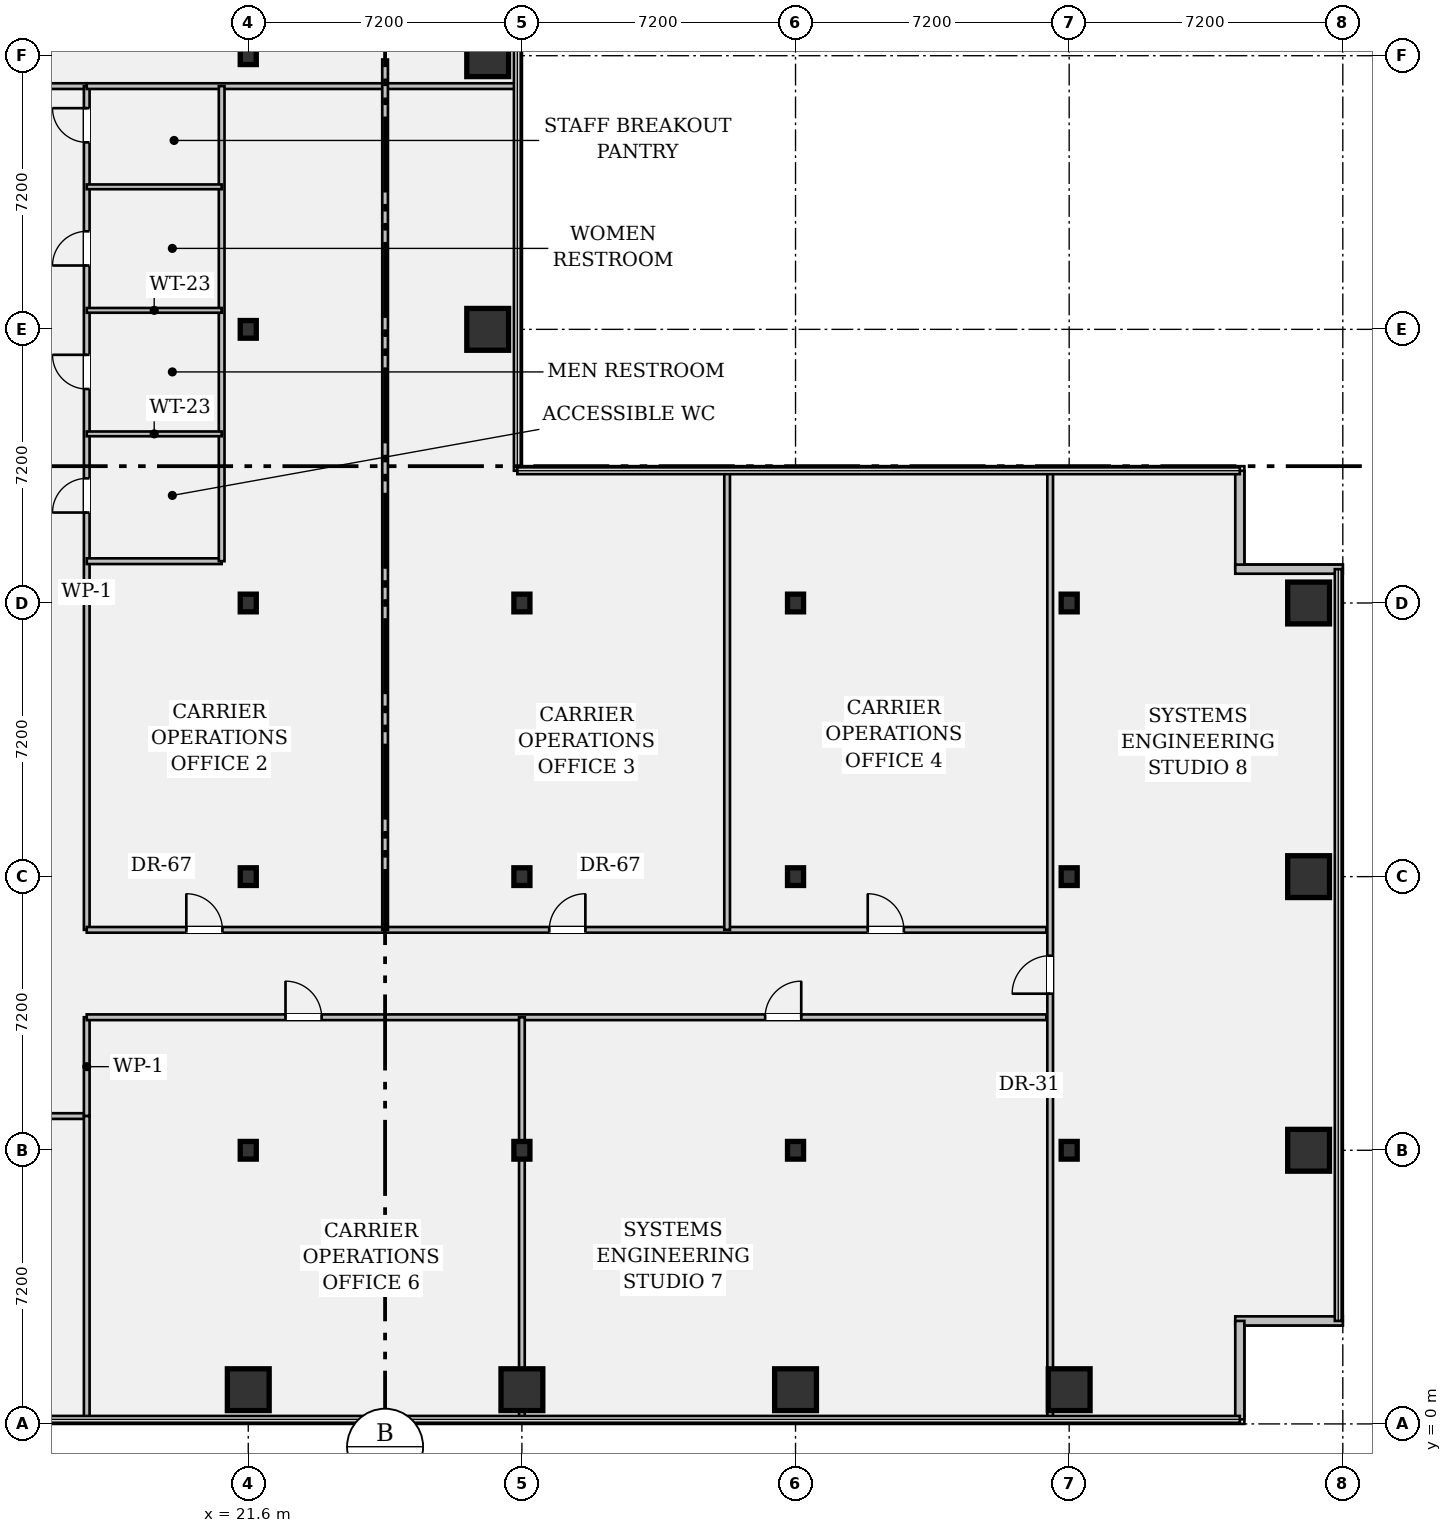
"""IFC4 building model, lengths in metres.
Left out: names, types, materials, properties, quantities, classifications, styles, units other than length and angle.
Written with IfcOpenShell. Run it as: python <this file> out.ifc"""

import sys

from ifc_helpers import new_model, si_unit, direction, frame, frame_2d, origin, origin_2d, place, context, subcontext, project, spatial, rectangle, hollow_rectangle, i_section, extrude, element, fill, save


model = new_model("IFC4")
c1 = context("Model", 3, precision=1e-05, world=origin(), true_north=direction((0.0, 1.0)))
c2 = subcontext(c1, "Body", "Model", "MODEL_VIEW")
j1 = project(units=[si_unit("LENGTHUNIT", "METRE"), si_unit("PLANEANGLEUNIT", "RADIAN")], contexts=[c1])
p1 = place(None, origin())
s1 = spatial("IfcSite", under=j1, at=p1, CompositionType="ELEMENT")
p2 = place(p1, origin())
s2 = spatial("IfcBuilding", under=s1, at=p2, CompositionType="ELEMENT")
p3 = place(p2, frame((0.0, 0.0, 31.15)))
s3 = spatial("IfcBuildingStorey", under=s2, at=p3, CompositionType="ELEMENT", Elevation=31.15)
p4 = place(p3, frame((21.6, 0.9, 0.0), z_axis=(0.0, 0.0, 1.0), x_axis=(1.0, 0.0, 0.0)))
e1 = element("IfcColumn", 1, at=p4, inside=s3, PredefinedType="COLUMN", context=c2, shape_type="SweptSolid", body=[
    extrude(hollow_rectangle(XDim=1.1, YDim=1.1, WallThickness=0.07, at=origin_2d()), origin(), (0.0, 0.0, 1.0), 3.57),
])
for number, where, z_axis, x_axis in (
    (2, (21.6, 7.2, 0.0), (0.0, 0.0, 1.0), (1.0, 0.0, 0.0)),
    (3, (21.6, 14.4, 0.0), (0.0, 0.0, 1.0), (1.0, 0.0, 0.0)),
    (4, (21.6, 21.6, 0.0), (0.0, 0.0, 1.0), (1.0, 0.0, 0.0)),
    (5, (21.6, 28.8, 0.0), (0.0, 0.0, 1.0), (1.0, 0.0, 0.0)),
    (6, (21.6, 36.0, 0.0), (0.0, 0.0, 1.0), (1.0, 0.0, 0.0)),
):
    element("IfcColumn", number, at=place(p3, frame(where, z_axis=z_axis, x_axis=x_axis)), inside=s3, PredefinedType="COLUMN", context=c2, shape_type="SweptSolid", body=[
        extrude(i_section(OverallWidth=0.422, OverallDepth=0.465, WebThickness=0.045, FlangeThickness=0.073, FilletRadius=0.018, at=origin_2d()), origin(), (0.0, 0.0, 1.0), 3.57),
    ])
for number, where, z_axis, x_axis in (
    (7, (27.9, 28.8, 0.0), (0.0, 0.0, 1.0), (1.0, 0.0, 0.0)),
    (8, (27.9, 36.0, 0.0), (0.0, 0.0, 1.0), (1.0, 0.0, 0.0)),
    (9, (28.8, 0.9, 0.0), (0.0, 0.0, 1.0), (1.0, 0.0, 0.0)),
):
    element("IfcColumn", number, at=place(p3, frame(where, z_axis=z_axis, x_axis=x_axis)), inside=s3, PredefinedType="COLUMN", context=c2, shape_type="SweptSolid", body=[
        extrude(hollow_rectangle(XDim=1.1, YDim=1.1, WallThickness=0.07, at=origin_2d()), origin(), (0.0, 0.0, 1.0), 3.57),
    ])
for number, where, z_axis, x_axis in (
    (10, (28.8, 7.2, 0.0), (0.0, 0.0, 1.0), (1.0, 0.0, 0.0)),
    (11, (28.8, 14.4, 0.0), (0.0, 0.0, 1.0), (1.0, 0.0, 0.0)),
    (12, (28.8, 21.6, 0.0), (0.0, 0.0, 1.0), (1.0, 0.0, 0.0)),
):
    element("IfcColumn", number, at=place(p3, frame(where, z_axis=z_axis, x_axis=x_axis)), inside=s3, PredefinedType="COLUMN", context=c2, shape_type="SweptSolid", body=[
        extrude(i_section(OverallWidth=0.422, OverallDepth=0.465, WebThickness=0.045, FlangeThickness=0.073, FilletRadius=0.018, at=origin_2d()), origin(), (0.0, 0.0, 1.0), 3.57),
    ])
p5 = place(p3, frame((36.0, 0.9, 0.0), z_axis=(0.0, 0.0, 1.0), x_axis=(1.0, 0.0, 0.0)))
e13 = element("IfcColumn", 13, at=p5, inside=s3, PredefinedType="COLUMN", context=c2, shape_type="SweptSolid", body=[
    extrude(hollow_rectangle(XDim=1.1, YDim=1.1, WallThickness=0.07, at=origin_2d()), origin(), (0.0, 0.0, 1.0), 3.57),
])
for number, where, z_axis, x_axis in (
    (14, (36.0, 7.2, 0.0), (0.0, 0.0, 1.0), (1.0, 0.0, 0.0)),
    (15, (36.0, 14.4, 0.0), (0.0, 0.0, 1.0), (1.0, 0.0, 0.0)),
    (16, (36.0, 21.6, 0.0), (0.0, 0.0, 1.0), (1.0, 0.0, 0.0)),
):
    element("IfcColumn", number, at=place(p3, frame(where, z_axis=z_axis, x_axis=x_axis)), inside=s3, PredefinedType="COLUMN", context=c2, shape_type="SweptSolid", body=[
        extrude(i_section(OverallWidth=0.422, OverallDepth=0.465, WebThickness=0.045, FlangeThickness=0.073, FilletRadius=0.018, at=origin_2d()), origin(), (0.0, 0.0, 1.0), 3.57),
    ])
p6 = place(p3, frame((43.2, 0.9, 0.0), z_axis=(0.0, 0.0, 1.0), x_axis=(1.0, 0.0, 0.0)))
e17 = element("IfcColumn", 17, at=p6, inside=s3, PredefinedType="COLUMN", context=c2, shape_type="SweptSolid", body=[
    extrude(hollow_rectangle(XDim=1.1, YDim=1.1, WallThickness=0.07, at=origin_2d()), origin(), (0.0, 0.0, 1.0), 3.57),
])
for number, where, z_axis, x_axis in (
    (18, (43.2, 7.2, 0.0), (0.0, 0.0, 1.0), (1.0, 0.0, 0.0)),
    (19, (43.2, 14.4, 0.0), (0.0, 0.0, 1.0), (1.0, 0.0, 0.0)),
    (20, (43.2, 21.6, 0.0), (0.0, 0.0, 1.0), (1.0, 0.0, 0.0)),
):
    element("IfcColumn", number, at=place(p3, frame(where, z_axis=z_axis, x_axis=x_axis)), inside=s3, PredefinedType="COLUMN", context=c2, shape_type="SweptSolid", body=[
        extrude(i_section(OverallWidth=0.422, OverallDepth=0.465, WebThickness=0.045, FlangeThickness=0.073, FilletRadius=0.018, at=origin_2d()), origin(), (0.0, 0.0, 1.0), 3.57),
    ])
for number, where, z_axis, x_axis in (
    (21, (49.5, 7.2, 0.0), (0.0, 0.0, 1.0), (1.0, 0.0, 0.0)),
    (22, (49.5, 14.4, 0.0), (0.0, 0.0, 1.0), (1.0, 0.0, 0.0)),
    (23, (49.5, 21.6, 0.0), (0.0, 0.0, 1.0), (1.0, 0.0, 0.0)),
):
    element("IfcColumn", number, at=place(p3, frame(where, z_axis=z_axis, x_axis=x_axis)), inside=s3, PredefinedType="COLUMN", context=c2, shape_type="SweptSolid", body=[
        extrude(hollow_rectangle(XDim=1.1, YDim=1.1, WallThickness=0.07, at=origin_2d()), origin(), (0.0, 0.0, 1.0), 3.57),
    ])
p7 = place(p3, frame((47.69, 25.08, 0.0), z_axis=(0.0, 0.0, 1.0), x_axis=(0.0, -1.0, 0.0)))
e24 = element("IfcWall", 24, at=p7, inside=s3, PredefinedType="STANDARD", context=c2, shape_type="SweptSolid", body=[
    extrude(rectangle(XDim=2.59, YDim=0.24, at=frame_2d((1.295, 0.0))), origin(), (0.0, 0.0, 1.0), 3.57),
])
for number, where, z_axis, x_axis in (
    (25, (47.57, 22.49, 0.0), (0.0, 0.0, 1.0), (1.0, 0.0, 0.0)),
    (26, (50.4, 2.71, 0.0), (0.0, 0.0, 1.0), (-1.0, 0.0, 0.0)),
):
    element("IfcWall", number, at=place(p3, frame(where, z_axis=z_axis, x_axis=x_axis)), inside=s3, PredefinedType="STANDARD", context=c2, shape_type="SweptSolid", body=[
        extrude(rectangle(XDim=2.83, YDim=0.24, at=frame_2d((1.415, 0.0))), origin(), (0.0, 0.0, 1.0), 3.57),
    ])
p8 = place(p3, frame((47.69, 2.71, 0.0), z_axis=(0.0, 0.0, 1.0), x_axis=(0.0, -1.0, 0.0)))
e27 = element("IfcWall", 27, at=p8, inside=s3, PredefinedType="STANDARD", context=c2, shape_type="SweptSolid", body=[
    extrude(rectangle(XDim=2.59, YDim=0.24, at=frame_2d((1.295, 0.0))), origin(), (0.0, 0.0, 1.0), 3.57),
])
p9 = place(p3, frame((14.4, 8.1, 0.0), z_axis=(0.0, 0.0, 1.0), x_axis=(1.0, 0.0, 0.0)))
e28 = element("IfcWall", 28, at=p9, inside=s3, PredefinedType="PARTITIONING", context=c2, shape_type="SweptSolid", body=[
    extrude(rectangle(XDim=2.95, YDim=0.15, at=frame_2d((1.475, 0.0))), origin(), (0.0, 0.0, 1.0), 2.628),
])
p10 = place(p9, frame((0.95, 0.0, 0.0)))
e29 = element("IfcOpeningElement", 29, at=p10, cuts=e28, PredefinedType="OPENING", context=c2, shape_type="SweptSolid", body=[
    extrude(rectangle(XDim=0.95, YDim=2.15, at=frame_2d((0.475, 1.075))), frame((0.0, 0.087, 0.0), z_axis=(0.0, -1.0, 0.0), x_axis=(1.0, 0.0, 0.0)), (0.0, 0.0, 1.0), 0.174),
])
p11 = place(p3, frame((14.4, 35.2, 0.0), z_axis=(0.0, 0.0, 1.0), x_axis=(1.0, 0.0, 0.0)))
e30 = element("IfcWall", 30, at=p11, inside=s3, PredefinedType="PARTITIONING", context=c2, shape_type="SweptSolid", body=[
    extrude(rectangle(XDim=2.95, YDim=0.15, at=frame_2d((1.475, 0.0))), origin(), (0.0, 0.0, 1.0), 2.628),
])
p12 = place(p11, frame((0.95, 0.0, 0.0)))
e31 = element("IfcOpeningElement", 31, at=p12, cuts=e30, PredefinedType="OPENING", context=c2, shape_type="SweptSolid", body=[
    extrude(rectangle(XDim=1.0, YDim=2.15, at=frame_2d((0.5, 1.075))), frame((0.0, 0.087, 0.0), z_axis=(0.0, -1.0, 0.0), x_axis=(1.0, 0.0, 0.0)), (0.0, 0.0, 1.0), 0.174),
])
p13 = place(p3, frame((17.35, 8.1, 0.0), z_axis=(0.0, 0.0, 1.0), x_axis=(0.0, 1.0, 0.0)))
e32 = element("IfcWall", 32, at=p13, inside=s3, PredefinedType="PARTITIONING", context=c2, shape_type="SweptSolid", body=[
    extrude(rectangle(XDim=2.6, YDim=0.15, at=frame_2d((1.3, 0.0))), origin(), (0.0, 0.0, 1.0), 3.57),
])
p14 = place(p3, frame((17.35, 13.0, 0.0), z_axis=(0.0, 0.0, 1.0), x_axis=(0.0, 1.0, 0.0)))
e33 = element("IfcWall", 33, at=p14, inside=s3, PredefinedType="PARTITIONING", context=c2, shape_type="SweptSolid", body=[
    extrude(rectangle(XDim=22.2, YDim=0.15, at=frame_2d((11.1, 0.0))), origin(), (0.0, 0.0, 1.0), 2.628),
])
p15 = place(p14, frame((10.98, 0.0, 0.0)))
e34 = element("IfcOpeningElement", 34, at=p15, cuts=e33, PredefinedType="OPENING", context=c2, shape_type="SweptSolid", body=[
    extrude(rectangle(XDim=0.9, YDim=2.15, at=frame_2d((0.45, 1.075))), frame((0.0, 0.087, 0.0), z_axis=(0.0, -1.0, 0.0), x_axis=(1.0, 0.0, 0.0)), (0.0, 0.0, 1.0), 0.174),
])
p16 = place(p14, frame((14.23, 0.0, 0.0)))
e35 = element("IfcOpeningElement", 35, at=p16, cuts=e33, PredefinedType="OPENING", context=c2, shape_type="SweptSolid", body=[
    extrude(rectangle(XDim=0.9, YDim=2.15, at=frame_2d((0.45, 1.075))), frame((0.0, 0.087, 0.0), z_axis=(0.0, -1.0, 0.0), x_axis=(1.0, 0.0, 0.0)), (0.0, 0.0, 1.0), 0.174),
])
p17 = place(p14, frame((17.48, 0.0, 0.0)))
e36 = element("IfcOpeningElement", 36, at=p17, cuts=e33, PredefinedType="OPENING", context=c2, shape_type="SweptSolid", body=[
    extrude(rectangle(XDim=0.9, YDim=2.15, at=frame_2d((0.45, 1.075))), frame((0.0, 0.087, 0.0), z_axis=(0.0, -1.0, 0.0), x_axis=(1.0, 0.0, 0.0)), (0.0, 0.0, 1.0), 0.174),
])
p18 = place(p14, frame((20.72, 0.0, 0.0)))
e37 = element("IfcOpeningElement", 37, at=p18, cuts=e33, PredefinedType="OPENING", context=c2, shape_type="SweptSolid", body=[
    extrude(rectangle(XDim=0.9, YDim=2.15, at=frame_2d((0.45, 1.075))), frame((0.0, 0.087, 0.0), z_axis=(0.0, -1.0, 0.0), x_axis=(1.0, 0.0, 0.0)), (0.0, 0.0, 1.0), 0.174),
])
p19 = place(p3, frame((17.35, 10.7, 0.0), z_axis=(0.0, 0.0, 1.0), x_axis=(1.0, 0.0, 0.0)))
e38 = element("IfcWall", 38, at=p19, inside=s3, PredefinedType="PARTITIONING", context=c2, shape_type="SweptSolid", body=[
    extrude(rectangle(XDim=25.25, YDim=0.15, at=frame_2d((12.625, 0.0))), origin(), (0.0, 0.0, 1.0), 2.628),
])
p20 = place(p19, frame((5.23, 0.0, 0.0)))
e39 = element("IfcOpeningElement", 39, at=p20, cuts=e38, PredefinedType="OPENING", context=c2, shape_type="SweptSolid", body=[
    extrude(rectangle(XDim=0.95, YDim=2.15, at=frame_2d((0.475, 1.075))), frame((0.0, 0.087, 0.0), z_axis=(0.0, -1.0, 0.0), x_axis=(1.0, 0.0, 0.0)), (0.0, 0.0, 1.0), 0.174),
])
p21 = place(p19, frame((17.85, 0.0, 0.0)))
e40 = element("IfcOpeningElement", 40, at=p21, cuts=e38, PredefinedType="OPENING", context=c2, shape_type="SweptSolid", body=[
    extrude(rectangle(XDim=0.95, YDim=2.15, at=frame_2d((0.475, 1.075))), frame((0.0, 0.087, 0.0), z_axis=(0.0, -1.0, 0.0), x_axis=(1.0, 0.0, 0.0)), (0.0, 0.0, 1.0), 0.174),
])
p22 = place(p3, frame((17.35, 13.0, 0.0), z_axis=(0.0, 0.0, 1.0), x_axis=(1.0, 0.0, 0.0)))
e41 = element("IfcWall", 41, at=p22, inside=s3, PredefinedType="PARTITIONING", context=c2, shape_type="SweptSolid", body=[
    extrude(rectangle(XDim=25.25, YDim=0.15, at=frame_2d((12.625, 0.0))), origin(), (0.0, 0.0, 1.0), 2.628),
])
p23 = place(p22, frame((2.62, 0.0, 0.0)))
e42 = element("IfcOpeningElement", 42, at=p23, cuts=e41, PredefinedType="OPENING", context=c2, shape_type="SweptSolid", body=[
    extrude(rectangle(XDim=0.95, YDim=2.15, at=frame_2d((0.475, 1.075))), frame((0.0, 0.087, 0.0), z_axis=(0.0, -1.0, 0.0), x_axis=(1.0, 0.0, 0.0)), (0.0, 0.0, 1.0), 0.174),
])
p24 = place(p22, frame((12.17, 0.0, 0.0)))
e43 = element("IfcOpeningElement", 43, at=p24, cuts=e41, PredefinedType="OPENING", context=c2, shape_type="SweptSolid", body=[
    extrude(rectangle(XDim=0.95, YDim=2.15, at=frame_2d((0.475, 1.075))), frame((0.0, 0.087, 0.0), z_axis=(0.0, -1.0, 0.0), x_axis=(1.0, 0.0, 0.0)), (0.0, 0.0, 1.0), 0.174),
])
p25 = place(p22, frame((20.55, 0.0, 0.0)))
e44 = element("IfcOpeningElement", 44, at=p25, cuts=e41, PredefinedType="OPENING", context=c2, shape_type="SweptSolid", body=[
    extrude(rectangle(XDim=0.95, YDim=2.15, at=frame_2d((0.475, 1.075))), frame((0.0, 0.087, 0.0), z_axis=(0.0, -1.0, 0.0), x_axis=(1.0, 0.0, 0.0)), (0.0, 0.0, 1.0), 0.174),
])
p26 = place(p3, frame((42.7, 0.12, 0.0), z_axis=(0.0, 0.0, 1.0), x_axis=(0.0, 1.0, 0.0)))
e45 = element("IfcWall", 45, at=p26, inside=s3, PredefinedType="PARTITIONING", context=c2, shape_type="SweptSolid", body=[
    extrude(rectangle(XDim=24.96, YDim=0.15, at=frame_2d((12.48, 0.0))), origin(), (0.0, 0.0, 1.0), 2.628),
])
p27 = place(p26, frame((11.2, 0.0, 0.0)))
e46 = element("IfcOpeningElement", 46, at=p27, cuts=e45, PredefinedType="OPENING", context=c2, shape_type="SweptSolid", body=[
    extrude(rectangle(XDim=1.0, YDim=2.15, at=frame_2d((0.5, 1.075))), frame((0.0, 0.087, 0.0), z_axis=(0.0, -1.0, 0.0), x_axis=(1.0, 0.0, 0.0)), (0.0, 0.0, 1.0), 0.174),
])
p28 = place(p3, frame((17.35, 35.2, 0.0), z_axis=(0.0, 0.0, 1.0), x_axis=(1.0, 0.0, 0.0)))
e47 = element("IfcWall", 47, at=p28, inside=s3, PredefinedType="PARTITIONING", context=c2, shape_type="SweptSolid", body=[
    extrude(rectangle(XDim=11.33, YDim=0.15, at=frame_2d((5.665, 0.0))), origin(), (0.0, 0.0, 1.0), 2.628),
])
p29 = place(p3, frame((17.35, 22.7, 0.0), z_axis=(0.0, 0.0, 1.0), x_axis=(1.0, 0.0, 0.0)))
e48 = element("IfcWall", 48, at=p29, inside=s3, PredefinedType="PARTITIONING", context=c2, shape_type="SweptSolid", body=[
    extrude(rectangle(XDim=3.55, YDim=0.15, at=frame_2d((1.775, 0.0))), origin(), (0.0, 0.0, 1.0), 3.088),
])
p30 = place(p3, frame((20.9, 22.7, 0.0), z_axis=(0.0, 0.0, 1.0), x_axis=(0.0, 1.0, 0.0)))
e49 = element("IfcWall", 49, at=p30, inside=s3, PredefinedType="PARTITIONING", context=c2, shape_type="SweptSolid", body=[
    extrude(rectangle(XDim=12.5, YDim=0.15, at=frame_2d((6.25, 0.0))), origin(), (0.0, 0.0, 1.0), 2.628),
])
for number, where, z_axis, x_axis in (
    (50, (17.35, 26.05, 0.0), (0.0, 0.0, 1.0), (1.0, 0.0, 0.0)),
    (51, (17.35, 29.3, 0.0), (0.0, 0.0, 1.0), (1.0, 0.0, 0.0)),
    (52, (17.35, 32.55, 0.0), (0.0, 0.0, 1.0), (1.0, 0.0, 0.0)),
):
    element("IfcWall", number, at=place(p3, frame(where, z_axis=z_axis, x_axis=x_axis)), inside=s3, PredefinedType="PARTITIONING", context=c2, shape_type="SweptSolid", body=[
        extrude(rectangle(XDim=3.55, YDim=0.125, at=frame_2d((1.775, 0.0))), origin(), (0.0, 0.0, 1.0), 3.088),
    ])
p31 = place(p3, frame((25.2, 13.0, 0.0), z_axis=(0.0, 0.0, 1.0), x_axis=(0.0, 1.0, 0.0)))
e53 = element("IfcWall", 53, at=p31, inside=s3, PredefinedType="PARTITIONING", context=c2, shape_type="SweptSolid", body=[
    extrude(rectangle(XDim=22.9, YDim=0.15, at=frame_2d((11.45, 0.0))), origin(), (0.0, 0.0, 1.0), 2.628),
])
p32 = place(p3, frame((34.2, 13.0, 0.0), z_axis=(0.0, 0.0, 1.0), x_axis=(0.0, 1.0, 0.0)))
e54 = element("IfcWall", 54, at=p32, inside=s3, PredefinedType="PARTITIONING", context=c2, shape_type="SweptSolid", body=[
    extrude(rectangle(XDim=12.05, YDim=0.15, at=frame_2d((6.025, 0.0))), origin(), (0.0, 0.0, 1.0), 2.628),
])
p33 = place(p3, frame((17.35, 0.12, 0.0), z_axis=(0.0, 0.0, 1.0), x_axis=(0.0, 1.0, 0.0)))
e55 = element("IfcWall", 55, at=p33, inside=s3, PredefinedType="PARTITIONING", context=c2, shape_type="SweptSolid", body=[
    extrude(rectangle(XDim=7.98, YDim=0.15, at=frame_2d((3.99, 0.0))), origin(), (0.0, 0.0, 1.0), 2.628),
])
p34 = place(p3, frame((28.8, 0.12, 0.0), z_axis=(0.0, 0.0, 1.0), x_axis=(0.0, 1.0, 0.0)))
e56 = element("IfcWall", 56, at=p34, inside=s3, PredefinedType="PARTITIONING", context=c2, shape_type="SweptSolid", body=[
    extrude(rectangle(XDim=10.58, YDim=0.15, at=frame_2d((5.29, 0.0))), origin(), (0.0, 0.0, 1.0), 2.628),
])
p35 = place(p15, origin())
e57 = element("IfcDoor", 57, at=p35, inside=s3, OperationType="SINGLE_SWING_LEFT", PredefinedType="DOOR", context=c2, shape_type="SweptSolid", body=[
    extrude(rectangle(XDim=0.9, YDim=2.15, at=frame_2d((0.45, 1.075))), frame((0.0, 0.025, 0.0), z_axis=(0.0, -1.0, 0.0), x_axis=(1.0, 0.0, 0.0)), (0.0, 0.0, 1.0), 0.05),
])
fill(e34, e57)
p36 = place(p16, origin())
e58 = element("IfcDoor", 58, at=p36, inside=s3, OperationType="SINGLE_SWING_RIGHT", PredefinedType="DOOR", context=c2, shape_type="SweptSolid", body=[
    extrude(rectangle(XDim=0.9, YDim=2.15, at=frame_2d((0.45, 1.075))), frame((0.0, 0.025, 0.0), z_axis=(0.0, -1.0, 0.0), x_axis=(1.0, 0.0, 0.0)), (0.0, 0.0, 1.0), 0.05),
])
fill(e35, e58)
p37 = place(p17, origin())
e59 = element("IfcDoor", 59, at=p37, inside=s3, OperationType="SINGLE_SWING_LEFT", PredefinedType="DOOR", context=c2, shape_type="SweptSolid", body=[
    extrude(rectangle(XDim=0.9, YDim=2.15, at=frame_2d((0.45, 1.075))), frame((0.0, 0.025, 0.0), z_axis=(0.0, -1.0, 0.0), x_axis=(1.0, 0.0, 0.0)), (0.0, 0.0, 1.0), 0.05),
])
fill(e36, e59)
p38 = place(p18, origin())
e60 = element("IfcDoor", 60, at=p38, inside=s3, OperationType="SINGLE_SWING_RIGHT", PredefinedType="DOOR", context=c2, shape_type="SweptSolid", body=[
    extrude(rectangle(XDim=0.9, YDim=2.15, at=frame_2d((0.45, 1.075))), frame((0.0, 0.025, 0.0), z_axis=(0.0, -1.0, 0.0), x_axis=(1.0, 0.0, 0.0)), (0.0, 0.0, 1.0), 0.05),
])
fill(e37, e60)
p39 = place(p23, origin())
e61 = element("IfcDoor", 61, at=p39, inside=s3, OperationType="SINGLE_SWING_LEFT", PredefinedType="DOOR", context=c2, shape_type="SweptSolid", body=[
    extrude(rectangle(XDim=0.95, YDim=2.15, at=frame_2d((0.475, 1.075))), frame((0.0, 0.025, 0.0), z_axis=(0.0, -1.0, 0.0), x_axis=(1.0, 0.0, 0.0)), (0.0, 0.0, 1.0), 0.05),
])
fill(e42, e61)
p40 = place(p24, origin())
e62 = element("IfcDoor", 62, at=p40, inside=s3, OperationType="SINGLE_SWING_RIGHT", PredefinedType="DOOR", context=c2, shape_type="SweptSolid", body=[
    extrude(rectangle(XDim=0.95, YDim=2.15, at=frame_2d((0.475, 1.075))), frame((0.0, 0.025, 0.0), z_axis=(0.0, -1.0, 0.0), x_axis=(1.0, 0.0, 0.0)), (0.0, 0.0, 1.0), 0.05),
])
fill(e43, e62)
p41 = place(p25, origin())
e63 = element("IfcDoor", 63, at=p41, inside=s3, OperationType="SINGLE_SWING_LEFT", PredefinedType="DOOR", context=c2, shape_type="SweptSolid", body=[
    extrude(rectangle(XDim=0.95, YDim=2.15, at=frame_2d((0.475, 1.075))), frame((0.0, 0.025, 0.0), z_axis=(0.0, -1.0, 0.0), x_axis=(1.0, 0.0, 0.0)), (0.0, 0.0, 1.0), 0.05),
])
fill(e44, e63)
p42 = place(p20, origin())
e64 = element("IfcDoor", 64, at=p42, inside=s3, OperationType="SINGLE_SWING_LEFT", PredefinedType="DOOR", context=c2, shape_type="SweptSolid", body=[
    extrude(rectangle(XDim=0.95, YDim=2.15, at=frame_2d((0.475, 1.075))), frame((0.0, 0.025, 0.0), z_axis=(0.0, -1.0, 0.0), x_axis=(1.0, 0.0, 0.0)), (0.0, 0.0, 1.0), 0.05),
])
fill(e39, e64)
p43 = place(p21, origin())
e65 = element("IfcDoor", 65, at=p43, inside=s3, OperationType="SINGLE_SWING_RIGHT", PredefinedType="DOOR", context=c2, shape_type="SweptSolid", body=[
    extrude(rectangle(XDim=0.95, YDim=2.15, at=frame_2d((0.475, 1.075))), frame((0.0, 0.025, 0.0), z_axis=(0.0, -1.0, 0.0), x_axis=(1.0, 0.0, 0.0)), (0.0, 0.0, 1.0), 0.05),
])
fill(e40, e65)
p44 = place(p27, origin())
e66 = element("IfcDoor", 66, at=p44, inside=s3, OperationType="SINGLE_SWING_LEFT", PredefinedType="DOOR", context=c2, shape_type="SweptSolid", body=[
    extrude(rectangle(XDim=1.0, YDim=2.15, at=frame_2d((0.5, 1.075))), frame((0.0, 0.025, 0.0), z_axis=(0.0, -1.0, 0.0), x_axis=(1.0, 0.0, 0.0)), (0.0, 0.0, 1.0), 0.05),
])
fill(e46, e66)
save(model, sys.argv[1])
